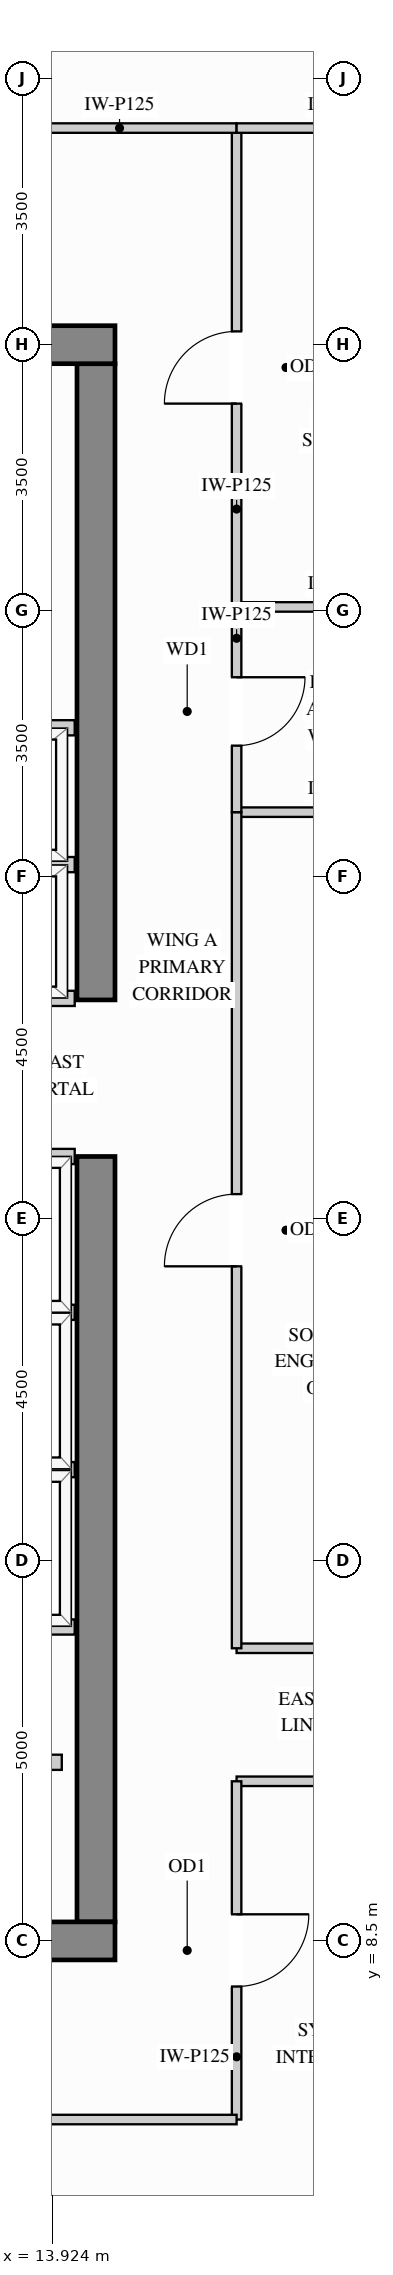
"""IFC4 building model, lengths in metres.
Left out: names, types, materials, properties, quantities, classifications, styles, units other than length and angle.
Written with IfcOpenShell. Run it as: python <this file> out.ifc"""

import sys

from ifc_helpers import new_model, si_unit, direction, frame, frame_2d, origin, place, context, subcontext, project, spatial, rectangle, extrude, source, transform, mapped, element, fill, save


model = new_model("IFC4")
c1 = context("Model", 3, precision=1e-05, world=origin(), true_north=direction((0.0, 1.0)))
c2 = subcontext(c1, "Body", "Model", "MODEL_VIEW")
j1 = project(units=[si_unit("LENGTHUNIT", "METRE"), si_unit("PLANEANGLEUNIT", "RADIAN")], contexts=[c1])
p1 = place(None, origin())
s1 = spatial("IfcSite", under=j1, at=p1, CompositionType="ELEMENT")
p2 = place(p1, origin())
s2 = spatial("IfcBuilding", under=s1, at=p2, CompositionType="ELEMENT")
p3 = place(p2, frame((0.0, 0.0, 273.6)))
s3 = spatial("IfcBuildingStorey", under=s2, at=p3, CompositionType="ELEMENT", Elevation=273.6)
m1 = source(origin(), c2, "Body", "SweptSolid", [
    extrude(rectangle(XDim=10.07, YDim=0.5, at=frame_2d((5.035, 0.0))), origin(), (0.0, 0.0, 1.0), 3.37),
])
p4 = place(p3, frame((14.5, 8.75, 0.0), z_axis=(0.0, 0.0, 1.0), x_axis=(0.0, 1.0, 0.0)))
e1 = element("IfcWall", 1, at=p4, inside=s3, PredefinedType="SHEAR", context=c2, shape_type="MappedRepresentation", body=[
    mapped(m1, transform((0.0, 0.0, 0.0), x_axis=(1.0, 0.0, 0.0), y_axis=(0.0, 1.0, 0.0), z_axis=(0.0, 0.0, 1.0))),
])
m2 = source(origin(), c2, "Body", "SweptSolid", [
    extrude(rectangle(XDim=8.37, YDim=0.5, at=frame_2d((4.185, 0.0))), origin(), (0.0, 0.0, 1.0), 3.37),
])
p5 = place(p3, frame((14.5, 20.88, 0.0), z_axis=(0.0, 0.0, 1.0), x_axis=(0.0, 1.0, 0.0)))
e2 = element("IfcWall", 2, at=p5, inside=s3, PredefinedType="SHEAR", context=c2, shape_type="MappedRepresentation", body=[
    mapped(m2, transform((0.0, 0.0, 0.0), x_axis=(1.0, 0.0, 0.0), y_axis=(0.0, 1.0, 0.0), z_axis=(0.0, 0.0, 1.0))),
])
m3 = source(origin(), c2, "Body", "SweptSolid", [
    extrude(rectangle(XDim=10.5, YDim=0.5, at=frame_2d((5.25, 0.0))), origin(), (0.0, 0.0, 1.0), 3.37),
])
for number, where, z_axis, x_axis in (
    (3, (4.25, 29.5, 0.0), (0.0, 0.0, 1.0), (1.0, 0.0, 0.0)),
    (4, (4.25, 8.5, 0.0), (0.0, 0.0, 1.0), (1.0, 0.0, 0.0)),
):
    element("IfcWall", number, at=place(p3, frame(where, z_axis=z_axis, x_axis=x_axis)), inside=s3, PredefinedType="SHEAR", context=c2, shape_type="MappedRepresentation", body=[
        mapped(m3, transform((0.0, 0.0, 0.0), x_axis=(1.0, 0.0, 0.0), y_axis=(0.0, 1.0, 0.0), z_axis=(0.0, 0.0, 1.0))),
    ])
m4 = source(origin(), c2, "Body", "SweptSolid", [
    extrude(rectangle(XDim=2.798, YDim=0.125, at=frame_2d((1.399, 0.0))), origin(), (0.0, 0.0, 1.0), 3.355),
])
for number, where, z_axis, x_axis in (
    (5, (16.35, 23.35, 0.0), (0.0, 0.0, 1.0), (1.0, 0.0, 0.0)),
    (6, (16.35, 26.05, 0.0), (0.0, 0.0, 1.0), (1.0, 0.0, 0.0)),
):
    element("IfcWall", number, at=place(p3, frame(where, z_axis=z_axis, x_axis=x_axis)), inside=s3, PredefinedType="PARTITIONING", context=c2, shape_type="MappedRepresentation", body=[
        mapped(m4, transform((0.0, 0.0, 0.0), x_axis=(1.0, 0.0, 0.0), y_axis=(0.0, 1.0, 0.0), z_axis=(0.0, 0.0, 1.0))),
    ])
m5 = source(origin(), c2, "Body", "SweptSolid", [
    extrude(rectangle(XDim=3.15, YDim=0.125, at=frame_2d((1.575, 0.0))), origin(), (0.0, 0.0, 1.0), 3.355),
])
for number, where, z_axis, x_axis in (
    (7, (16.35, 12.35, 0.0), (0.0, 0.0, 1.0), (1.0, 0.0, 0.0)),
    (8, (16.35, 10.6, 0.0), (0.0, 0.0, 1.0), (1.0, 0.0, 0.0)),
):
    element("IfcWall", number, at=place(p3, frame(where, z_axis=z_axis, x_axis=x_axis)), inside=s3, PredefinedType="PARTITIONING", context=c2, shape_type="MappedRepresentation", body=[
        mapped(m5, transform((0.0, 0.0, 0.0), x_axis=(1.0, 0.0, 0.0), y_axis=(0.0, 1.0, 0.0), z_axis=(0.0, 0.0, 1.0))),
    ])
p6 = place(p3, frame((16.35, 6.15, 0.0), z_axis=(0.0, 0.0, 1.0), x_axis=(0.0, 1.0, 0.0)))
e9 = element("IfcWall", 9, at=p6, inside=s3, PredefinedType="PARTITIONING", context=c2, shape_type="SweptSolid", body=[
    extrude(rectangle(XDim=4.45, YDim=0.125, at=frame_2d((2.225, 0.0))), origin(), (0.0, 0.0, 1.0), 3.355),
])
p7 = place(p6, frame((1.75, 0.0, 0.0)))
e10 = element("IfcOpeningElement", 10, at=p7, cuts=e9, PredefinedType="OPENING", context=c2, shape_type="SweptSolid", body=[
    extrude(rectangle(XDim=0.95, YDim=2.15, at=frame_2d((0.475, 1.075))), frame((0.0, 0.073, 0.0), z_axis=(0.0, -1.0, 0.0), x_axis=(1.0, 0.0, 0.0)), (0.0, 0.0, 1.0), 0.145),
])
p8 = place(p3, frame((16.35, 12.35, 0.0), z_axis=(0.0, 0.0, 1.0), x_axis=(0.0, 1.0, 0.0)))
e11 = element("IfcWall", 11, at=p8, inside=s3, PredefinedType="PARTITIONING", context=c2, shape_type="SweptSolid", body=[
    extrude(rectangle(XDim=11.0, YDim=0.125, at=frame_2d((5.5, 0.0))), origin(), (0.0, 0.0, 1.0), 3.355),
])
p9 = place(p8, frame((5.025, 0.0, 0.0)))
e12 = element("IfcOpeningElement", 12, at=p9, cuts=e11, PredefinedType="OPENING", context=c2, shape_type="SweptSolid", body=[
    extrude(rectangle(XDim=0.95, YDim=2.15, at=frame_2d((0.475, 1.075))), frame((0.0, 0.073, 0.0), z_axis=(0.0, -1.0, 0.0), x_axis=(1.0, 0.0, 0.0)), (0.0, 0.0, 1.0), 0.145),
])
p10 = place(p3, frame((16.35, 26.05, 0.0), z_axis=(0.0, 0.0, 1.0), x_axis=(0.0, 1.0, 0.0)))
e13 = element("IfcWall", 13, at=p10, inside=s3, PredefinedType="PARTITIONING", context=c2, shape_type="SweptSolid", body=[
    extrude(rectangle(XDim=6.3, YDim=0.125, at=frame_2d((3.15, 0.0))), origin(), (0.0, 0.0, 1.0), 3.355),
])
p11 = place(p10, frame((2.675, 0.0, 0.0)))
e14 = element("IfcOpeningElement", 14, at=p11, cuts=e13, PredefinedType="OPENING", context=c2, shape_type="SweptSolid", body=[
    extrude(rectangle(XDim=0.95, YDim=2.15, at=frame_2d((0.475, 1.075))), frame((0.0, 0.073, 0.0), z_axis=(0.0, -1.0, 0.0), x_axis=(1.0, 0.0, 0.0)), (0.0, 0.0, 1.0), 0.145),
])
p12 = place(p3, frame((16.35, 23.35, 0.0), z_axis=(0.0, 0.0, 1.0), x_axis=(0.0, 1.0, 0.0)))
e15 = element("IfcWall", 15, at=p12, inside=s3, PredefinedType="PARTITIONING", context=c2, shape_type="SweptSolid", body=[
    extrude(rectangle(XDim=2.7, YDim=0.125, at=frame_2d((1.35, 0.0))), origin(), (0.0, 0.0, 1.0), 3.355),
])
p13 = place(p12, frame((0.875, 0.0, 0.0)))
e16 = element("IfcOpeningElement", 16, at=p13, cuts=e15, PredefinedType="OPENING", context=c2, shape_type="SweptSolid", body=[
    extrude(rectangle(XDim=0.9, YDim=2.15, at=frame_2d((0.45, 1.075))), frame((0.0, 0.073, 0.0), z_axis=(0.0, -1.0, 0.0), x_axis=(1.0, 0.0, 0.0)), (0.0, 0.0, 1.0), 0.145),
])
p14 = place(p3, frame((9.039, 32.35, 0.0), z_axis=(0.0, 0.0, 1.0), x_axis=(1.0, 0.0, 0.0)))
e17 = element("IfcWall", 17, at=p14, inside=s3, PredefinedType="PARTITIONING", context=c2, shape_type="SweptSolid", body=[
    extrude(rectangle(XDim=7.311, YDim=0.125, at=frame_2d((3.656, 0.0))), origin(), (0.0, 0.0, 1.0), 3.355),
])
p15 = place(p14, frame((3.18, 0.0, 0.0)))
e18 = element("IfcOpeningElement", 18, at=p15, cuts=e17, PredefinedType="OPENING", context=c2, shape_type="SweptSolid", body=[
    extrude(rectangle(XDim=0.95, YDim=2.15, at=frame_2d((0.475, 1.075))), frame((0.0, 0.073, 0.0), z_axis=(0.0, -1.0, 0.0), x_axis=(1.0, 0.0, 0.0)), (0.0, 0.0, 1.0), 0.145),
])
p16 = place(p3, frame((16.35, 32.35, 0.0), z_axis=(0.0, 0.0, 1.0), x_axis=(1.0, 0.0, 0.0)))
e19 = element("IfcWall", 19, at=p16, inside=s3, PredefinedType="PARTITIONING", context=c2, shape_type="MappedRepresentation", body=[
    mapped(m4, transform((0.0, 0.0, 0.0), x_axis=(1.0, 0.0, 0.0), y_axis=(0.0, 1.0, 0.0), z_axis=(0.0, 0.0, 1.0))),
])
p17 = place(p3, frame((10.179, 6.15, 0.0), z_axis=(0.0, 0.0, 1.0), x_axis=(1.0, 0.0, 0.0)))
e20 = element("IfcWall", 20, at=p17, inside=s3, PredefinedType="PARTITIONING", context=c2, shape_type="SweptSolid", body=[
    extrude(rectangle(XDim=6.171, YDim=0.125, at=frame_2d((3.085, 0.0))), origin(), (0.0, 0.0, 1.0), 3.355),
])
p18 = place(p17, frame((2.611, 0.0, 0.0)))
e21 = element("IfcOpeningElement", 21, at=p18, cuts=e20, PredefinedType="OPENING", context=c2, shape_type="SweptSolid", body=[
    extrude(rectangle(XDim=0.95, YDim=2.15, at=frame_2d((0.475, 1.075))), frame((0.0, 0.073, 0.0), z_axis=(0.0, -1.0, 0.0), x_axis=(1.0, 0.0, 0.0)), (0.0, 0.0, 1.0), 0.145),
])
m6 = source(origin(), c2, "Body", "SweptSolid", [
    extrude(rectangle(XDim=1.63, YDim=0.2, at=frame_2d((0.815, 0.0))), origin(), (0.0, 0.0, 1.0), 3.355),
])
p19 = place(p3, frame((12.42, 10.85, 0.0), z_axis=(0.0, 0.0, 1.0), x_axis=(1.0, 0.0, 0.0)))
e22 = element("IfcWall", 22, at=p19, inside=s3, PredefinedType="PARTITIONING", context=c2, shape_type="MappedRepresentation", body=[
    mapped(m6, transform((0.0, 0.0, 0.0), x_axis=(1.0, 0.0, 0.0), y_axis=(0.0, 1.0, 0.0), z_axis=(0.0, 0.0, 1.0))),
])
m7 = source(origin(), c2, "Body", "SweptSolid", [
    extrude(rectangle(XDim=2.39, YDim=0.2, at=frame_2d((1.195, 0.0))), origin(), (0.0, 0.0, 1.0), 3.355),
])
for number, where, z_axis, x_axis in (
    (23, (11.83, 22.66, 0.0), (0.0, 0.0, 1.0), (1.0, 0.0, 0.0)),
    (24, (11.83, 20.9, 0.0), (0.0, 0.0, 1.0), (1.0, 0.0, 0.0)),
    (25, (11.83, 24.46, 0.0), (0.0, 0.0, 1.0), (1.0, 0.0, 0.0)),
):
    element("IfcWall", number, at=place(p3, frame(where, z_axis=z_axis, x_axis=x_axis)), inside=s3, PredefinedType="PARTITIONING", context=c2, shape_type="MappedRepresentation", body=[
        mapped(m7, transform((0.0, 0.0, 0.0), x_axis=(1.0, 0.0, 0.0), y_axis=(0.0, 1.0, 0.0), z_axis=(0.0, 0.0, 1.0))),
    ])
m8 = source(origin(), c2, "Body", "SweptSolid", [
    extrude(rectangle(XDim=1.99, YDim=0.2, at=frame_2d((0.995, 0.0))), origin(), (0.0, 0.0, 1.0), 3.355),
])
for number, where, z_axis, x_axis in (
    (26, (12.23, 14.7, 0.0), (0.0, 0.0, 1.0), (1.0, 0.0, 0.0)),
    (27, (12.23, 12.63, 0.0), (0.0, 0.0, 1.0), (1.0, 0.0, 0.0)),
    (28, (12.23, 16.77, 0.0), (0.0, 0.0, 1.0), (1.0, 0.0, 0.0)),
    (29, (12.23, 18.82, 0.0), (0.0, 0.0, 1.0), (1.0, 0.0, 0.0)),
):
    element("IfcWall", number, at=place(p3, frame(where, z_axis=z_axis, x_axis=x_axis)), inside=s3, PredefinedType="PARTITIONING", context=c2, shape_type="MappedRepresentation", body=[
        mapped(m8, transform((0.0, 0.0, 0.0), x_axis=(1.0, 0.0, 0.0), y_axis=(0.0, 1.0, 0.0), z_axis=(0.0, 0.0, 1.0))),
    ])
m9 = source(origin(), c2, "Body", "SweptSolid", [
    extrude(rectangle(XDim=0.95, YDim=2.15, at=frame_2d((0.475, 1.075))), frame((0.0, 0.025, 0.0), z_axis=(0.0, -1.0, 0.0), x_axis=(1.0, 0.0, 0.0)), (0.0, 0.0, 1.0), 0.05),
])
p20 = place(p7, origin())
e30 = element("IfcDoor", 30, at=p20, inside=s3, OperationType="SINGLE_SWING_RIGHT", PredefinedType="DOOR", context=c2, shape_type="MappedRepresentation", body=[
    mapped(m9, transform((0.0, 0.0, 0.0), x_axis=(1.0, 0.0, 0.0), y_axis=(0.0, 1.0, 0.0), z_axis=(0.0, 0.0, 1.0))),
])
fill(e10, e30)
p21 = place(p9, origin())
e31 = element("IfcDoor", 31, at=p21, inside=s3, OperationType="SINGLE_SWING_LEFT", PredefinedType="DOOR", context=c2, shape_type="MappedRepresentation", body=[
    mapped(m9, transform((0.0, 0.0, 0.0), x_axis=(1.0, 0.0, 0.0), y_axis=(0.0, 1.0, 0.0), z_axis=(0.0, 0.0, 1.0))),
])
fill(e12, e31)
p22 = place(p11, origin())
e32 = element("IfcDoor", 32, at=p22, inside=s3, OperationType="SINGLE_SWING_LEFT", PredefinedType="DOOR", context=c2, shape_type="MappedRepresentation", body=[
    mapped(m9, transform((0.0, 0.0, 0.0), x_axis=(1.0, 0.0, 0.0), y_axis=(0.0, 1.0, 0.0), z_axis=(0.0, 0.0, 1.0))),
])
fill(e14, e32)
m10 = source(origin(), c2, "Body", "SweptSolid", [
    extrude(rectangle(XDim=0.9, YDim=2.15, at=frame_2d((0.45, 1.075))), frame((0.0, 0.025, 0.0), z_axis=(0.0, -1.0, 0.0), x_axis=(1.0, 0.0, 0.0)), (0.0, 0.0, 1.0), 0.05),
])
p23 = place(p13, origin())
e33 = element("IfcDoor", 33, at=p23, inside=s3, OperationType="SINGLE_SWING_RIGHT", PredefinedType="DOOR", context=c2, shape_type="MappedRepresentation", body=[
    mapped(m10, transform((0.0, 0.0, 0.0), x_axis=(1.0, 0.0, 0.0), y_axis=(0.0, 1.0, 0.0), z_axis=(0.0, 0.0, 1.0))),
])
fill(e16, e33)
save(model, sys.argv[1])
